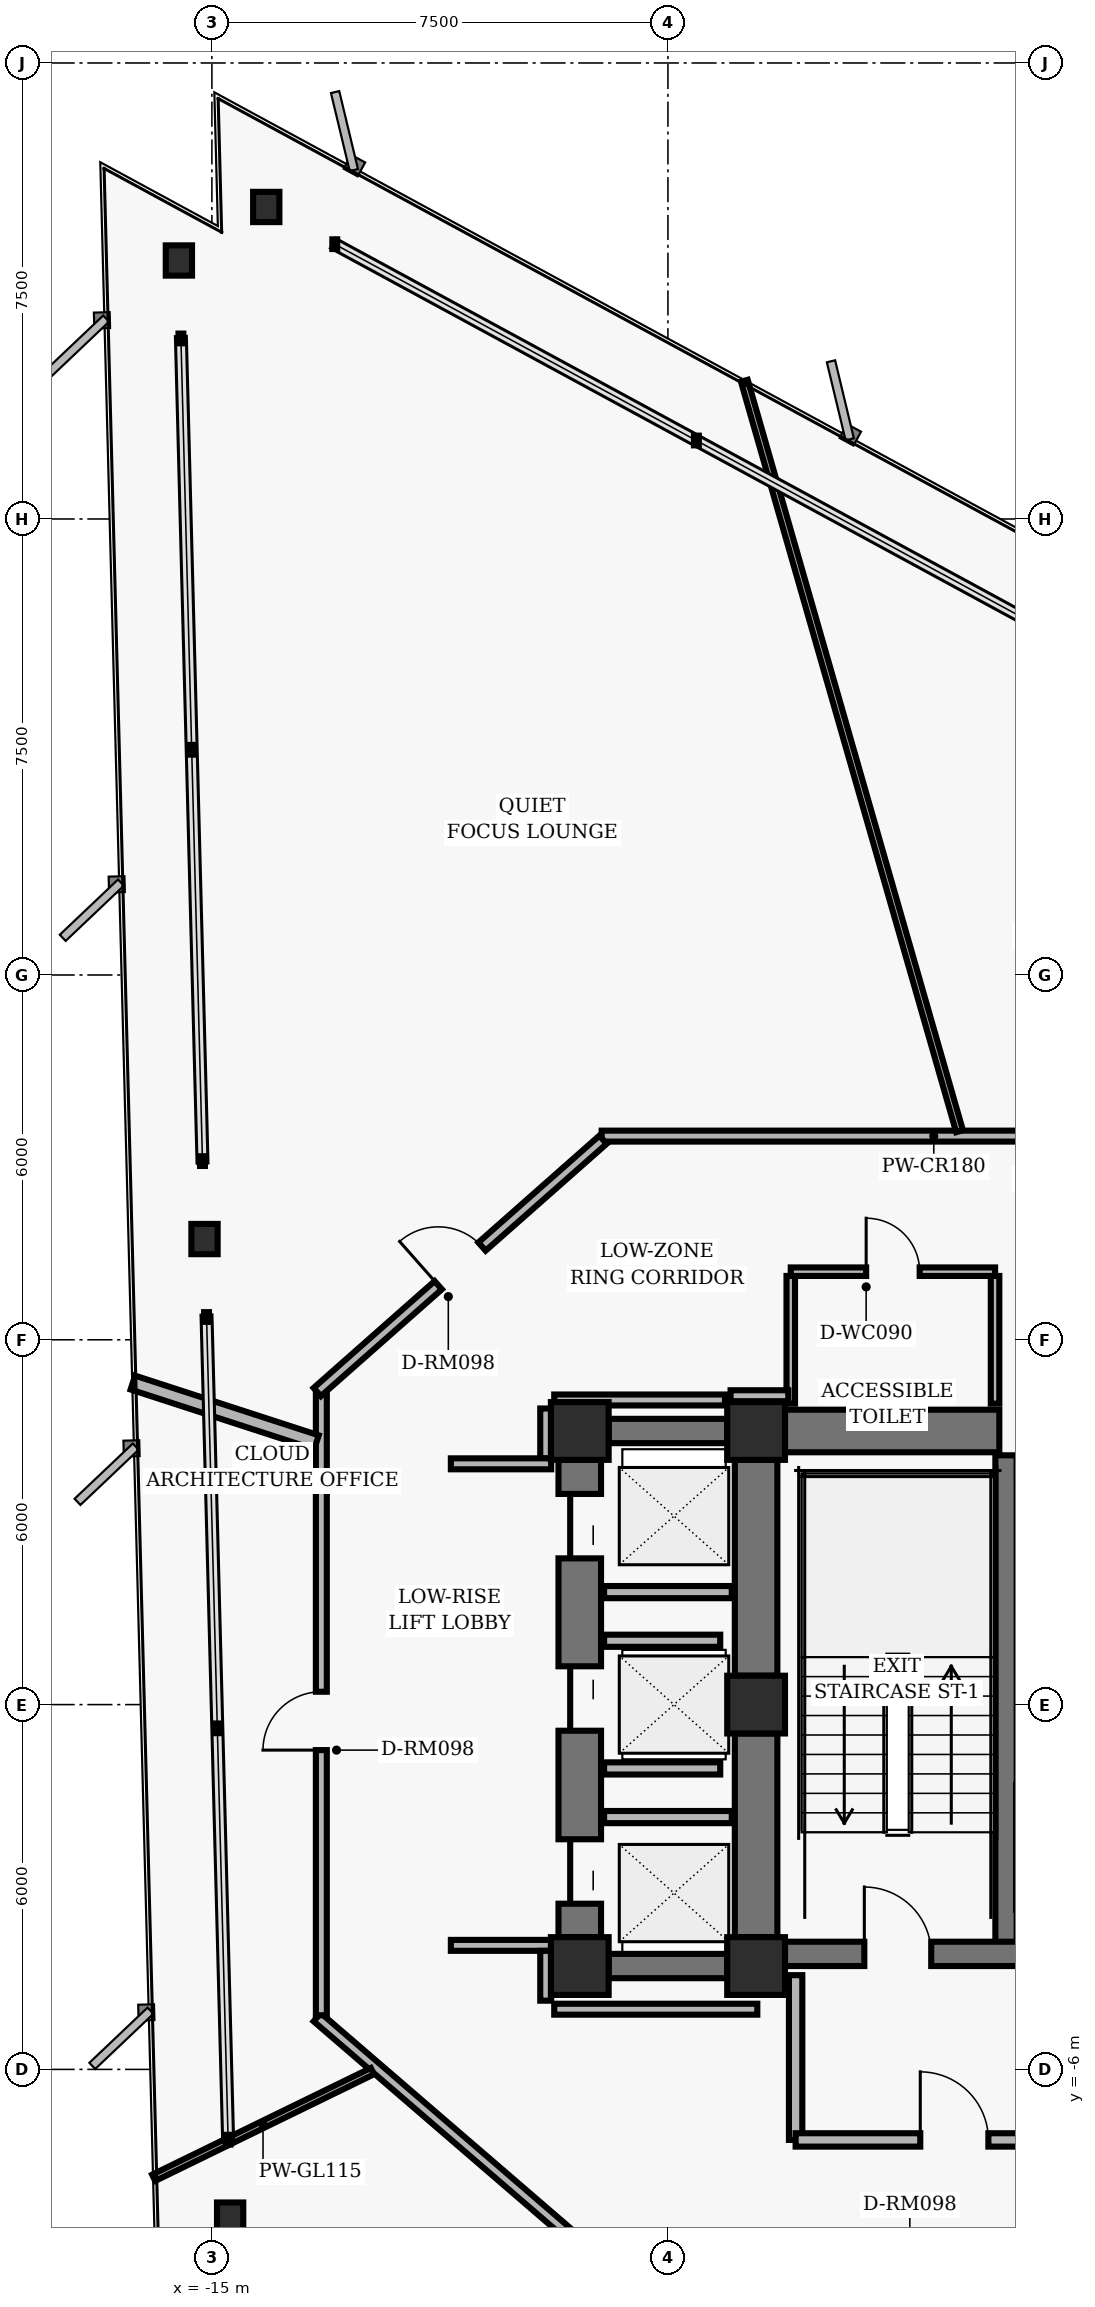
"""IFC4 building model, lengths in metres.
Left out: names, types, materials, properties, quantities, classifications, styles, units other than length and angle.
Written with IfcOpenShell. Run it as: python <this file> out.ifc"""

import sys

from ifc_helpers import new_model, si_unit, direction, frame, frame_2d, origin, origin_2d, place, context, subcontext, project, spatial, rectangle, hollow_rectangle, i_section, extrude, element, fill, save


model = new_model("IFC4")
c1 = context("Model", 3, precision=1e-05, world=origin(), true_north=direction((0.0, 1.0)))
c2 = subcontext(c1, "Body", "Model", "MODEL_VIEW")
j1 = project(units=[si_unit("LENGTHUNIT", "METRE"), si_unit("PLANEANGLEUNIT", "RADIAN")], contexts=[c1])
p1 = place(None, origin())
s1 = spatial("IfcSite", under=j1, at=p1, CompositionType="ELEMENT")
p2 = place(p1, origin())
s2 = spatial("IfcBuilding", under=s1, at=p2, CompositionType="ELEMENT")
p3 = place(p2, frame((0.0, 0.0, 25.6)))
s3 = spatial("IfcBuildingStorey", under=s2, at=p3, CompositionType="ELEMENT", Elevation=25.6)
for number, where, z_axis, x_axis in (
    (1, (-6.05, 4.5, 0.0), (0.0, 0.0, 1.0), (1.0, 0.0, 0.0)),
    (2, (-6.05, 0.0, 0.0), (0.0, 0.0, 1.0), (1.0, 0.0, 0.0)),
    (3, (-6.05, -4.3, 0.0), (0.0, 0.0, 1.0), (1.0, 0.0, 0.0)),
    (4, (-8.95, 4.5, 0.0), (0.0, 0.0, 1.0), (1.0, 0.0, 0.0)),
    (5, (-8.95, -4.3, 0.0), (0.0, 0.0, 1.0), (1.0, 0.0, 0.0)),
):
    element("IfcColumn", number, at=place(p3, frame(where, z_axis=z_axis, x_axis=x_axis)), inside=s3, PredefinedType="COLUMN", context=c2, shape_type="SweptSolid", body=[
        extrude(hollow_rectangle(XDim=0.95, YDim=0.95, WallThickness=0.06, InnerFilletRadius=0.02, OuterFilletRadius=0.04, at=origin_2d()), origin(), (0.0, 0.0, 1.0), 3.36),
    ])
p4 = place(p3, frame((-6.05, 0.475, 0.0), z_axis=(0.0, 0.0, 1.0), x_axis=(0.0, 1.0, 0.0)))
e6 = element("IfcWall", 6, at=p4, inside=s3, PredefinedType="SHEAR", context=c2, shape_type="SweptSolid", body=[
    extrude(rectangle(XDim=3.55, YDim=0.7, at=frame_2d((1.775, 0.0))), origin(), (0.0, 0.0, 1.0), 3.098),
])
p5 = place(p3, frame((-6.05, -3.825, 0.0), z_axis=(0.0, 0.0, 1.0), x_axis=(0.0, 1.0, 0.0)))
e7 = element("IfcWall", 7, at=p5, inside=s3, PredefinedType="SHEAR", context=c2, shape_type="SweptSolid", body=[
    extrude(rectangle(XDim=3.35, YDim=0.7, at=frame_2d((1.675, 0.0))), origin(), (0.0, 0.0, 1.0), 3.098),
])
p6 = place(p3, frame((-1.94, -4.1, 0.0), z_axis=(0.0, 0.0, 1.0), x_axis=(0.0, 1.0, 0.0)))
e8 = element("IfcWall", 8, at=p6, inside=s3, PredefinedType="SHEAR", context=c2, shape_type="SweptSolid", body=[
    extrude(rectangle(XDim=8.2, YDim=0.35, at=frame_2d((4.1, 0.0))), origin(), (0.0, 0.0, 1.0), 3.098),
])
p7 = place(p3, frame((-5.575, -4.1, 0.0), z_axis=(0.0, 0.0, 1.0), x_axis=(1.0, 0.0, 0.0)))
e9 = element("IfcWall", 9, at=p7, inside=s3, PredefinedType="SHEAR", context=c2, shape_type="SweptSolid", body=[
    extrude(rectangle(XDim=11.15, YDim=0.4, at=frame_2d((5.575, 0.0))), origin(), (0.0, 0.0, 1.0), 3.098),
])
p8 = place(p7, frame((1.305, 0.0, 0.0)))
e10 = element("IfcOpeningElement", 10, at=p8, cuts=e9, PredefinedType="OPENING", context=c2, shape_type="SweptSolid", body=[
    extrude(rectangle(XDim=1.1, YDim=2.04, at=frame_2d((0.55, 1.02))), frame((0.0, 0.21, 0.0), z_axis=(0.0, -1.0, 0.0), x_axis=(1.0, 0.0, 0.0)), (0.0, 0.0, 1.0), 0.42),
])
p9 = place(p7, frame((8.745, 0.0, 0.0)))
e11 = element("IfcOpeningElement", 11, at=p9, cuts=e9, PredefinedType="OPENING", context=c2, shape_type="SweptSolid", body=[
    extrude(rectangle(XDim=1.1, YDim=2.04, at=frame_2d((0.55, 1.02))), frame((0.0, 0.21, 0.0), z_axis=(0.0, -1.0, 0.0), x_axis=(1.0, 0.0, 0.0)), (0.0, 0.0, 1.0), 0.42),
])
p10 = place(p7, frame((4.045, 0.0, 0.0)))
e12 = element("IfcOpeningElement", 12, at=p10, cuts=e9, PredefinedType="OPENING", context=c2, shape_type="SweptSolid", body=[
    extrude(rectangle(XDim=1.06, YDim=2.04, at=frame_2d((0.53, 1.02))), frame((0.0, 0.21, 0.0), z_axis=(0.0, -1.0, 0.0), x_axis=(1.0, 0.0, 0.0)), (0.0, 0.0, 1.0), 0.42),
])
p11 = place(p7, frame((6.045, 0.0, 0.0)))
e13 = element("IfcOpeningElement", 13, at=p11, cuts=e9, PredefinedType="OPENING", context=c2, shape_type="SweptSolid", body=[
    extrude(rectangle(XDim=1.06, YDim=2.04, at=frame_2d((0.53, 1.02))), frame((0.0, 0.21, 0.0), z_axis=(0.0, -1.0, 0.0), x_axis=(1.0, 0.0, 0.0)), (0.0, 0.0, 1.0), 0.42),
])
p12 = place(p3, frame((-5.575, 4.5, 0.0), z_axis=(0.0, 0.0, 1.0), x_axis=(1.0, 0.0, 0.0)))
e14 = element("IfcWall", 14, at=p12, inside=s3, PredefinedType="SHEAR", context=c2, shape_type="SweptSolid", body=[
    extrude(rectangle(XDim=3.525, YDim=0.7, at=frame_2d((1.762, 0.0))), origin(), (0.0, 0.0, 1.0), 3.098),
])
p13 = place(p3, frame((-8.95, -3.825, 0.0), z_axis=(0.0, 0.0, 1.0), x_axis=(0.0, 1.0, 0.0)))
e15 = element("IfcWall", 15, at=p13, inside=s3, PredefinedType="SHEAR", context=c2, shape_type="SweptSolid", body=[
    extrude(rectangle(XDim=7.85, YDim=0.7, at=frame_2d((3.925, 0.0))), origin(), (0.0, 0.0, 1.0), 3.098),
])
p14 = place(p13, frame((0.55, 0.0, 0.0)))
e16 = element("IfcOpeningElement", 16, at=p14, cuts=e15, PredefinedType="OPENING", context=c2, shape_type="SweptSolid", body=[
    extrude(rectangle(XDim=1.06, YDim=2.04, at=frame_2d((0.53, 1.02))), frame((0.0, 0.36, 0.0), z_axis=(0.0, -1.0, 0.0), x_axis=(1.0, 0.0, 0.0)), (0.0, 0.0, 1.0), 0.72),
])
p15 = place(p13, frame((3.395, 0.0, 0.0)))
e17 = element("IfcOpeningElement", 17, at=p15, cuts=e15, PredefinedType="OPENING", context=c2, shape_type="SweptSolid", body=[
    extrude(rectangle(XDim=1.06, YDim=2.04, at=frame_2d((0.53, 1.02))), frame((0.0, 0.36, 0.0), z_axis=(0.0, -1.0, 0.0), x_axis=(1.0, 0.0, 0.0)), (0.0, 0.0, 1.0), 0.72),
])
p16 = place(p13, frame((6.23, 0.0, 0.0)))
e18 = element("IfcOpeningElement", 18, at=p16, cuts=e15, PredefinedType="OPENING", context=c2, shape_type="SweptSolid", body=[
    extrude(rectangle(XDim=1.06, YDim=2.04, at=frame_2d((0.53, 1.02))), frame((0.0, 0.36, 0.0), z_axis=(0.0, -1.0, 0.0), x_axis=(1.0, 0.0, 0.0)), (0.0, 0.0, 1.0), 0.72),
])
for number, where, z_axis, x_axis in (
    (19, (-8.475, 4.5, 0.0), (0.0, 0.0, 1.0), (1.0, 0.0, 0.0)),
    (20, (-8.475, -4.3, 0.0), (0.0, 0.0, 1.0), (1.0, 0.0, 0.0)),
):
    element("IfcWall", number, at=place(p3, frame(where, z_axis=z_axis, x_axis=x_axis)), inside=s3, PredefinedType="SHEAR", context=c2, shape_type="SweptSolid", body=[
        extrude(rectangle(XDim=1.95, YDim=0.4, at=frame_2d((0.975, 0.0))), origin(), (0.0, 0.0, 1.0), 3.098),
    ])
for number, where, z_axis, x_axis in (
    (21, (-14.106, 24.632, 0.0), (0.0, 0.0, 1.0), (1.0, 0.0, 0.0)),
    (22, (-15.543, 23.751, 0.0), (0.0, 0.0, 1.0), (1.0, 0.0, 0.0)),
    (23, (-15.121, 7.657, 0.0), (0.0, 0.0, 1.0), (1.0, 0.0, 0.0)),
    (24, (-14.7, -8.438, 0.0), (0.0, 0.0, 1.0), (1.0, 0.0, 0.0)),
):
    element("IfcColumn", number, at=place(p3, frame(where, z_axis=z_axis, x_axis=x_axis)), inside=s3, PredefinedType="COLUMN", context=c2, shape_type="SweptSolid", body=[
        extrude(i_section(OverallWidth=0.432, OverallDepth=0.498, WebThickness=0.056, FlangeThickness=0.089, FilletRadius=0.025, at=origin_2d()), origin(), (0.0, 0.0, 1.0), 3.36),
    ])
p17 = place(p3, frame((-5.4, -7.16, 0.0), z_axis=(0.0, 0.0, 1.0), x_axis=(0.0, 1.0, 0.0)))
e25 = element("IfcWall", 25, at=p17, inside=s3, PredefinedType="PARTITIONING", context=c2, shape_type="SweptSolid", body=[
    extrude(rectangle(XDim=2.71, YDim=0.22, at=frame_2d((1.355, 0.0))), origin(), (0.0, 0.0, 1.0), 3.073),
])
p18 = place(p3, frame((-5.4, -7.16, 0.0), z_axis=(0.0, 0.0, 1.0), x_axis=(1.0, 0.0, 0.0)))
e26 = element("IfcWall", 26, at=p18, inside=s3, PredefinedType="PARTITIONING", context=c2, shape_type="SweptSolid", body=[
    extrude(rectangle(XDim=5.4, YDim=0.22, at=frame_2d((2.7, 0.0))), origin(), (0.0, 0.0, 1.0), 3.073),
])
p19 = place(p18, frame((2.05, 0.0, 0.0)))
e27 = element("IfcOpeningElement", 27, at=p19, cuts=e26, PredefinedType="OPENING", context=c2, shape_type="SweptSolid", body=[
    extrude(rectangle(XDim=1.12, YDim=2.02, at=frame_2d((0.56, 1.01))), frame((0.0, 0.12, 0.0), z_axis=(0.0, -1.0, 0.0), x_axis=(1.0, 0.0, 0.0)), (0.0, 0.0, 1.0), 0.24),
])
for number, where, z_axis, x_axis in (
    (28, (-5.48, 4.95, 0.0), (0.0, 0.0, 1.0), (0.0, 1.0, 0.0)),
    (29, (-2.12, 4.95, 0.0), (0.0, 0.0, 1.0), (0.0, 1.0, 0.0)),
):
    element("IfcWall", number, at=place(p3, frame(where, z_axis=z_axis, x_axis=x_axis)), inside=s3, PredefinedType="PARTITIONING", context=c2, shape_type="SweptSolid", body=[
        extrude(rectangle(XDim=2.1, YDim=0.14, at=frame_2d((1.05, 0.0))), origin(), (0.0, 0.0, 1.0), 3.073),
    ])
p20 = place(p3, frame((-5.48, 7.12, 0.0), z_axis=(0.0, 0.0, 1.0), x_axis=(1.0, 0.0, 0.0)))
e30 = element("IfcWall", 30, at=p20, inside=s3, PredefinedType="PARTITIONING", context=c2, shape_type="SweptSolid", body=[
    extrude(rectangle(XDim=3.36, YDim=0.14, at=frame_2d((1.68, 0.0))), origin(), (0.0, 0.0, 1.0), 3.073),
])
p21 = place(p20, frame((1.24, 0.0, 0.0)))
e31 = element("IfcOpeningElement", 31, at=p21, cuts=e30, PredefinedType="OPENING", context=c2, shape_type="SweptSolid", body=[
    extrude(rectangle(XDim=0.88, YDim=2.02, at=frame_2d((0.44, 1.01))), frame((0.0, 0.08, 0.0), z_axis=(0.0, -1.0, 0.0), x_axis=(1.0, 0.0, 0.0)), (0.0, 0.0, 1.0), 0.16),
])
for number, where, z_axis, x_axis in (
    (32, (-8.55, -1.85, 0.0), (0.0, 0.0, 1.0), (1.0, 0.0, 0.0)),
    (33, (-8.55, 1.85, 0.0), (0.0, 0.0, 1.0), (1.0, 0.0, 0.0)),
):
    element("IfcWall", number, at=place(p3, frame(where, z_axis=z_axis, x_axis=x_axis)), inside=s3, PredefinedType="PARTITIONING", context=c2, shape_type="SweptSolid", body=[
        extrude(rectangle(XDim=2.1, YDim=0.2, at=frame_2d((1.05, 0.0))), origin(), (0.0, 0.0, 1.0), 3.073),
    ])
for number, where, z_axis, x_axis in (
    (34, (-8.55, -1.05, 0.0), (0.0, 0.0, 1.0), (1.0, 0.0, 0.0)),
    (35, (-8.55, 1.05, 0.0), (0.0, 0.0, 1.0), (1.0, 0.0, 0.0)),
):
    element("IfcWall", number, at=place(p3, frame(where, z_axis=z_axis, x_axis=x_axis)), inside=s3, PredefinedType="PARTITIONING", context=c2, shape_type="SweptSolid", body=[
        extrude(rectangle(XDim=1.91, YDim=0.2, at=frame_2d((0.955, 0.0))), origin(), (0.0, 0.0, 1.0), 3.073),
    ])
p22 = place(p3, frame((-8.59, 9.35, 0.0), z_axis=(0.0, 0.0, 1.0), x_axis=(1.0, 0.0, 0.0)))
e36 = element("IfcWall", 36, at=p22, inside=s3, PredefinedType="PARTITIONING", context=c2, shape_type="SweptSolid", body=[
    extrude(rectangle(XDim=17.18, YDim=0.18, at=frame_2d((8.59, 0.0))), origin(), (0.0, 0.0, 1.0), 2.587),
])
p23 = place(p22, frame((10.924, 0.0, 0.0)))
e37 = element("IfcOpeningElement", 37, at=p23, cuts=e36, PredefinedType="OPENING", context=c2, shape_type="SweptSolid", body=[
    extrude(rectangle(XDim=0.96, YDim=2.02, at=frame_2d((0.48, 1.01))), frame((0.0, 0.1, 0.0), z_axis=(0.0, -1.0, 0.0), x_axis=(1.0, 0.0, 0.0)), (0.0, 0.0, 1.0), 0.2),
])
p24 = place(p3, frame((-8.568, -9.191, 0.0), z_axis=(0.0, 0.0, 1.0), x_axis=(-0.757556899173, 0.652769135694, 0.0)))
e38 = element("IfcWall", 38, at=p24, inside=s3, PredefinedType="PARTITIONING", context=c2, shape_type="SweptSolid", body=[
    extrude(rectangle(XDim=6.204, YDim=0.18, at=frame_2d((3.102, 0.0))), origin(), (0.0, 0.0, 1.0), 3.073),
])
p25 = place(p3, frame((-13.2, -5.11, 0.0), z_axis=(0.0, 0.0, 1.0), x_axis=(0.0, 1.0, 0.0)))
e39 = element("IfcWall", 39, at=p25, inside=s3, PredefinedType="PARTITIONING", context=c2, shape_type="SweptSolid", body=[
    extrude(rectangle(XDim=10.22, YDim=0.18, at=frame_2d((5.11, 0.0))), origin(), (0.0, 0.0, 1.0), 2.587),
])
p26 = place(p25, frame((4.361, 0.0, 0.0)))
e40 = element("IfcOpeningElement", 40, at=p26, cuts=e39, PredefinedType="OPENING", context=c2, shape_type="SweptSolid", body=[
    extrude(rectangle(XDim=0.96, YDim=2.02, at=frame_2d((0.48, 1.01))), frame((0.0, 0.1, 0.0), z_axis=(0.0, -1.0, 0.0), x_axis=(1.0, 0.0, 0.0)), (0.0, 0.0, 1.0), 0.2),
])
p27 = place(p3, frame((-13.268, 5.14, 0.0), z_axis=(0.0, 0.0, 1.0), x_axis=(0.749626463267, 0.66186113768, 0.0)))
e41 = element("IfcWall", 41, at=p27, inside=s3, PredefinedType="PARTITIONING", context=c2, shape_type="SweptSolid", body=[
    extrude(rectangle(XDim=6.27, YDim=0.18, at=frame_2d((3.135, 0.0))), origin(), (0.0, 0.0, 1.0), 3.073),
])
p28 = place(p27, frame((2.655, 0.0, 0.0)))
e42 = element("IfcOpeningElement", 42, at=p28, cuts=e41, PredefinedType="OPENING", context=c2, shape_type="SweptSolid", body=[
    extrude(rectangle(XDim=0.96, YDim=2.02, at=frame_2d((0.48, 1.01))), frame((0.0, 0.1, 0.0), z_axis=(0.0, -1.0, 0.0), x_axis=(1.0, 0.0, 0.0)), (0.0, 0.0, 1.0), 0.2),
])
p29 = place(p3, frame((-9.51, 4.87, 0.0), z_axis=(0.0, 0.0, 1.0), x_axis=(0.0, -1.0, 0.0)))
e43 = element("IfcWall", 43, at=p29, inside=s3, PredefinedType="PARTITIONING", context=c2, shape_type="SweptSolid", body=[
    extrude(rectangle(XDim=0.82, YDim=0.18, at=frame_2d((0.41, 0.0))), origin(), (0.0, 0.0, 1.0), 3.073),
])
for number, where, z_axis, x_axis in (
    (44, (-9.42, 3.96, 0.0), (0.0, 0.0, 1.0), (-1.0, 0.0, 0.0)),
    (45, (-11.07, -3.96, 0.0), (0.0, 0.0, 1.0), (1.0, 0.0, 0.0)),
):
    element("IfcWall", number, at=place(p3, frame(where, z_axis=z_axis, x_axis=x_axis)), inside=s3, PredefinedType="PARTITIONING", context=c2, shape_type="SweptSolid", body=[
        extrude(rectangle(XDim=1.65, YDim=0.18, at=frame_2d((0.825, 0.0))), origin(), (0.0, 0.0, 1.0), 3.073),
    ])
p30 = place(p3, frame((-9.51, -4.05, 0.0), z_axis=(0.0, 0.0, 1.0), x_axis=(0.0, -1.0, 0.0)))
e46 = element("IfcWall", 46, at=p30, inside=s3, PredefinedType="PARTITIONING", context=c2, shape_type="SweptSolid", body=[
    extrude(rectangle(XDim=0.82, YDim=0.18, at=frame_2d((0.41, 0.0))), origin(), (0.0, 0.0, 1.0), 2.358),
])
p31 = place(p3, frame((-9.37, -5.01, 0.0), z_axis=(0.0, 0.0, 1.0), x_axis=(1.0, 0.0, 0.0)))
e47 = element("IfcWall", 47, at=p31, inside=s3, PredefinedType="PARTITIONING", context=c2, shape_type="SweptSolid", body=[
    extrude(rectangle(XDim=3.34, YDim=0.18, at=frame_2d((1.67, 0.0))), origin(), (0.0, 0.0, 1.0), 3.073),
])
p32 = place(p3, frame((-5.52, 5.08, 0.0), z_axis=(0.0, 0.0, 1.0), x_axis=(-1.0, 0.0, 0.0)))
e48 = element("IfcWall", 48, at=p32, inside=s3, PredefinedType="PARTITIONING", context=c2, shape_type="SweptSolid", body=[
    extrude(rectangle(XDim=0.95, YDim=0.18, at=frame_2d((0.475, 0.0))), origin(), (0.0, 0.0, 1.0), 3.073),
])
p33 = place(p3, frame((-6.562, 5.01, 0.0), z_axis=(0.0, 0.0, 1.0), x_axis=(-1.0, 0.0, 0.0)))
e49 = element("IfcWall", 49, at=p33, inside=s3, PredefinedType="PARTITIONING", context=c2, shape_type="SweptSolid", body=[
    extrude(rectangle(XDim=2.808, YDim=0.18, at=frame_2d((1.404, 0.0))), origin(), (0.0, 0.0, 1.0), 3.073),
])
p34 = place(p3, frame((-12.361, -6.029, 0.0), z_axis=(0.0, 0.0, 1.0), x_axis=(-0.898800692661, -0.438357519466, 0.0)))
e50 = element("IfcWall", 50, at=p34, inside=s3, PredefinedType="MOVABLE", context=c2, shape_type="SweptSolid", body=[
    extrude(rectangle(XDim=4.002, YDim=0.115, at=frame_2d((2.001, 0.0))), origin(), (0.0, 0.0, 1.0), 3.073),
])
p35 = place(p3, frame((-2.704, 9.43, 0.0), z_axis=(0.0, 0.0, 1.0), x_axis=(-0.275627518328, 0.961264516738, 0.0)))
e51 = element("IfcWall", 51, at=p35, inside=s3, PredefinedType="MOVABLE", context=c2, shape_type="SweptSolid", body=[
    extrude(rectangle(XDim=12.841, YDim=0.115, at=frame_2d((6.42, 0.0))), origin(), (0.0, 0.0, 1.0), 3.073),
])
p36 = place(p3, frame((-13.28, 4.315, 0.0), z_axis=(0.0, 0.0, 1.0), x_axis=(-0.951062315171, 0.3089991467, 0.0)))
e52 = element("IfcWall", 52, at=p36, inside=s3, PredefinedType="PARTITIONING", context=c2, shape_type="SweptSolid", body=[
    extrude(rectangle(XDim=3.176, YDim=0.24, at=frame_2d((1.588, 0.0))), origin(), (0.0, 0.0, 1.0), 3.073),
])
p37 = place(p8, origin())
e53 = element("IfcDoor", 53, at=p37, inside=s3, OperationType="SINGLE_SWING_LEFT", PredefinedType="DOOR", context=c2, shape_type="SweptSolid", body=[
    extrude(rectangle(XDim=1.1, YDim=2.04, at=frame_2d((0.55, 1.02))), frame((0.0, 0.025, 0.0), z_axis=(0.0, -1.0, 0.0), x_axis=(1.0, 0.0, 0.0)), (0.0, 0.0, 1.0), 0.05),
])
fill(e10, e53)
p38 = place(p19, origin())
e54 = element("IfcDoor", 54, at=p38, inside=s3, OperationType="SINGLE_SWING_LEFT", PredefinedType="DOOR", context=c2, shape_type="SweptSolid", body=[
    extrude(rectangle(XDim=1.12, YDim=2.02, at=frame_2d((0.56, 1.01))), frame((0.0, 0.025, 0.0), z_axis=(0.0, -1.0, 0.0), x_axis=(1.0, 0.0, 0.0)), (0.0, 0.0, 1.0), 0.05),
])
fill(e27, e54)
p39 = place(p21, origin())
e55 = element("IfcDoor", 55, at=p39, inside=s3, OperationType="SINGLE_SWING_LEFT", PredefinedType="DOOR", context=c2, shape_type="SweptSolid", body=[
    extrude(rectangle(XDim=0.88, YDim=2.02, at=frame_2d((0.44, 1.01))), frame((0.0, 0.025, 0.0), z_axis=(0.0, -1.0, 0.0), x_axis=(1.0, 0.0, 0.0)), (0.0, 0.0, 1.0), 0.05),
])
fill(e31, e55)
p40 = place(p14, origin())
e56 = element("IfcDoor", 56, at=p40, inside=s3, OperationType="SLIDING_TO_LEFT", PredefinedType="DOOR", context=c2, shape_type="SweptSolid", body=[
    extrude(rectangle(XDim=1.06, YDim=2.04, at=frame_2d((0.53, 1.02))), frame((0.0, 0.025, 0.0), z_axis=(0.0, -1.0, 0.0), x_axis=(1.0, 0.0, 0.0)), (0.0, 0.0, 1.0), 0.05),
])
fill(e16, e56)
p41 = place(p15, origin())
e57 = element("IfcDoor", 57, at=p41, inside=s3, OperationType="SLIDING_TO_RIGHT", PredefinedType="DOOR", context=c2, shape_type="SweptSolid", body=[
    extrude(rectangle(XDim=1.06, YDim=2.04, at=frame_2d((0.53, 1.02))), frame((0.0, 0.025, 0.0), z_axis=(0.0, -1.0, 0.0), x_axis=(1.0, 0.0, 0.0)), (0.0, 0.0, 1.0), 0.05),
])
fill(e17, e57)
p42 = place(p16, origin())
e58 = element("IfcDoor", 58, at=p42, inside=s3, OperationType="SLIDING_TO_LEFT", PredefinedType="DOOR", context=c2, shape_type="SweptSolid", body=[
    extrude(rectangle(XDim=1.06, YDim=2.04, at=frame_2d((0.53, 1.02))), frame((0.0, 0.025, 0.0), z_axis=(0.0, -1.0, 0.0), x_axis=(1.0, 0.0, 0.0)), (0.0, 0.0, 1.0), 0.05),
])
fill(e18, e58)
p43 = place(p26, origin())
e59 = element("IfcDoor", 59, at=p43, inside=s3, OperationType="SINGLE_SWING_LEFT", PredefinedType="DOOR", context=c2, shape_type="SweptSolid", body=[
    extrude(rectangle(XDim=0.96, YDim=2.02, at=frame_2d((0.48, 1.01))), frame((0.0, 0.025, 0.0), z_axis=(0.0, -1.0, 0.0), x_axis=(1.0, 0.0, 0.0)), (0.0, 0.0, 1.0), 0.05),
])
fill(e40, e59)
p44 = place(p28, origin())
e60 = element("IfcDoor", 60, at=p44, inside=s3, OperationType="SINGLE_SWING_LEFT", PredefinedType="DOOR", context=c2, shape_type="SweptSolid", body=[
    extrude(rectangle(XDim=0.96, YDim=2.02, at=frame_2d((0.48, 1.01))), frame((0.0, 0.025, 0.0), z_axis=(0.0, -1.0, 0.0), x_axis=(1.0, 0.0, 0.0)), (0.0, 0.0, 1.0), 0.05),
])
fill(e42, e60)
save(model, sys.argv[1])
